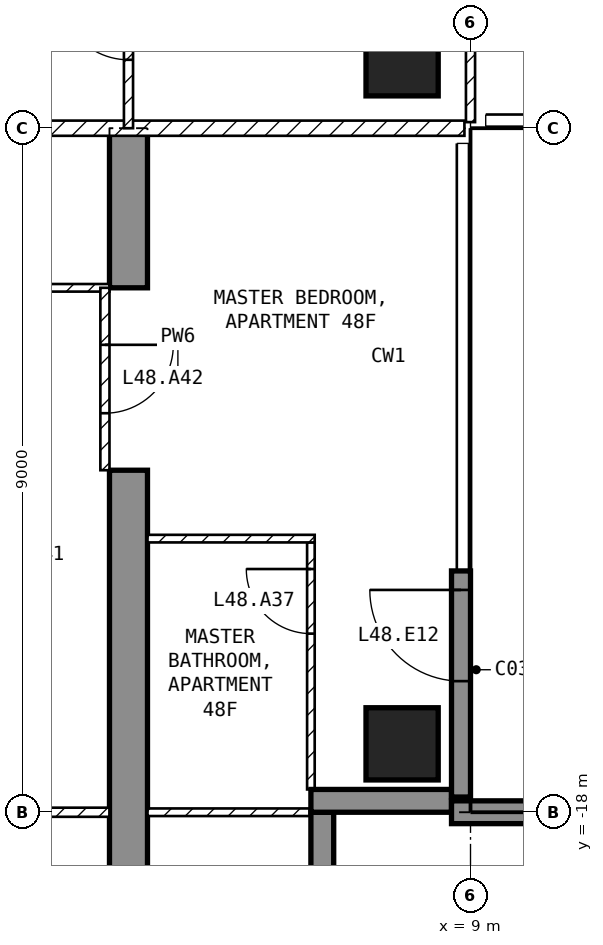
"""IFC4 building model, lengths in metres.
Left out: names, types, materials, properties, quantities, classifications, styles, units other than length and angle.
Written with IfcOpenShell. Run it as: python <this file> out.ifc"""

import sys

from ifc_helpers import new_model, si_unit, direction, frame, frame_2d, origin, origin_2d, place, context, subcontext, project, spatial, polyline, rectangle, outline, extrude, element, fill, save


model = new_model("IFC4")
c1 = context("Model", 3, precision=1e-05, world=origin(), true_north=direction((0.0, 1.0)))
c2 = subcontext(c1, "Body", "Model", "MODEL_VIEW")
j1 = project(units=[si_unit("LENGTHUNIT", "METRE"), si_unit("PLANEANGLEUNIT", "RADIAN")], contexts=[c1])
p1 = place(None, origin())
s1 = spatial("IfcSite", under=j1, at=p1, CompositionType="ELEMENT")
p2 = place(p1, origin())
s2 = spatial("IfcBuilding", under=s1, at=p2, CompositionType="ELEMENT")
p3 = place(p2, frame((0.0, 0.0, 194.6)))
s3 = spatial("IfcBuildingStorey", under=s2, at=p3, CompositionType="ELEMENT", Elevation=194.6)
for number, where, z_axis, x_axis in (
    (1, (8.1, -17.1, -0.25), (0.0, 0.0, 1.0), (1.0, 0.0, 0.0)),
    (2, (8.1, -8.1, -0.25), (0.0, 0.0, 1.0), (1.0, 0.0, 0.0)),
):
    element("IfcColumn", number, at=place(p3, frame(where, z_axis=z_axis, x_axis=x_axis)), inside=s3, PredefinedType="COLUMN", context=c2, shape_type="SweptSolid", body=[
        extrude(rectangle(XDim=0.95, YDim=0.95, at=origin_2d()), origin(), (0.0, 0.0, 1.0), 3.5),
    ])
p4 = place(p3, frame((4.25, -20.225, -0.25), z_axis=(1.0, 0.0, 0.0), x_axis=(0.0, 1.0, 0.0)))
e3 = element("IfcWall", 3, at=p4, inside=s3, PredefinedType="SHEAR", context=c2, shape_type="SweptSolid", body=[
    extrude(outline(polyline([(0.0, 0.0), (6.725, 0.0), (6.725, 2.65), (9.125, 2.65), (9.125, 0.0), (11.225, 0.0), (11.225, 3.5), (0.0, 3.5), (0.0, 0.0)])), origin(), (0.0, 0.0, 1.0), 0.5),
])
p5 = place(p3, frame((8.875, -17.8, 0.0), z_axis=(0.0, 0.0, 1.0), x_axis=(0.0, 1.0, 0.0)))
e4 = element("IfcWall", 4, at=p5, inside=s3, PredefinedType="SOLIDWALL", context=c2, shape_type="SweptSolid", body=[
    extrude(rectangle(XDim=2.975, YDim=0.25, at=frame_2d((1.488, 0.0))), origin(), (0.0, 0.0, 1.0), 3.25),
])
p6 = place(p5, frame((1.525, 0.0, 0.0)))
e5 = element("IfcOpeningElement", 5, at=p6, cuts=e4, PredefinedType="OPENING", context=c2, shape_type="SweptSolid", body=[
    extrude(rectangle(XDim=1.2, YDim=2.4, at=frame_2d((0.6, 1.2))), frame((0.0, 0.135, 0.0), z_axis=(0.0, -1.0, 0.0), x_axis=(1.0, 0.0, 0.0)), (0.0, 0.0, 1.0), 0.27),
])
p7 = place(p3, frame((7.05, -19.8, 0.0), z_axis=(0.0, 0.0, 1.0), x_axis=(0.0, 1.0, 0.0)))
e6 = element("IfcWall", 6, at=p7, inside=s3, PredefinedType="SOLIDWALL", context=c2, shape_type="SweptSolid", body=[
    extrude(rectangle(XDim=1.8, YDim=0.3, at=frame_2d((0.9, 0.0))), origin(), (0.0, 0.0, 1.0), 3.25),
])
p8 = place(p3, frame((6.9, -17.85, 0.0), z_axis=(0.0, 0.0, 1.0), x_axis=(1.0, 0.0, 0.0)))
e7 = element("IfcWall", 7, at=p8, inside=s3, PredefinedType="SOLIDWALL", context=c2, shape_type="SweptSolid", body=[
    extrude(rectangle(XDim=1.85, YDim=0.3, at=frame_2d((0.925, 0.0))), origin(), (0.0, 0.0, 1.0), 3.25),
])
p9 = place(p3, frame((8.75, -18.0, 0.0), z_axis=(0.0, 0.0, 1.0), x_axis=(1.0, 0.0, 0.0)))
e8 = element("IfcWall", 8, at=p9, inside=s3, PredefinedType="SOLIDWALL", context=c2, shape_type="SweptSolid", body=[
    extrude(rectangle(XDim=2.95, YDim=0.3, at=frame_2d((1.475, 0.0))), origin(), (0.0, 0.0, 1.0), 3.25),
])
p10 = place(p3, frame((8.92, -9.0, 0.0), z_axis=(0.0, 0.0, 1.0), x_axis=(-1.0, 0.0, 0.0)))
e9 = element("IfcWall", 9, at=p10, inside=s3, PredefinedType="PARTITIONING", context=c2, shape_type="SweptSolid", body=[
    extrude(rectangle(XDim=17.84, YDim=0.2, at=frame_2d((8.92, 0.0))), origin(), (0.0, 0.0, 1.0), 3.25),
])
p11 = place(p10, frame((8.42, 0.0, 0.0)))
e10 = element("IfcOpeningElement", 10, at=p11, cuts=e9, PredefinedType="OPENING", context=c2, shape_type="SweptSolid", body=[
    extrude(rectangle(XDim=1.0, YDim=2.1, at=frame_2d((0.5, 1.05))), frame((0.0, 0.11, 0.0), z_axis=(0.0, -1.0, 0.0), x_axis=(1.0, 0.0, 0.0)), (0.0, 0.0, 1.0), 0.22),
])
p12 = place(p3, frame((9.0, -8.92, 0.0), z_axis=(0.0, 0.0, 1.0), x_axis=(0.0, 1.0, 0.0)))
e11 = element("IfcWall", 11, at=p12, inside=s3, PredefinedType="PARTITIONING", context=c2, shape_type="SweptSolid", body=[
    extrude(rectangle(XDim=7.62, YDim=0.12, at=frame_2d((3.81, 0.0))), origin(), (0.0, 0.0, 1.0), 3.25),
])
p13 = place(p12, frame((2.62, 0.0, 0.0)))
e12 = element("IfcOpeningElement", 12, at=p13, cuts=e11, PredefinedType="OPENING", context=c2, shape_type="SweptSolid", body=[
    extrude(rectangle(XDim=0.9, YDim=2.1, at=frame_2d((0.45, 1.05))), frame((0.0, 0.07, 0.0), z_axis=(0.0, -1.0, 0.0), x_axis=(1.0, 0.0, 0.0)), (0.0, 0.0, 1.0), 0.14),
])
p14 = place(p3, frame((4.5, -9.0, 0.0), z_axis=(0.0, 0.0, 1.0), x_axis=(0.0, 1.0, 0.0)))
e13 = element("IfcWall", 13, at=p14, inside=s3, PredefinedType="PARTITIONING", context=c2, shape_type="SweptSolid", body=[
    extrude(rectangle(XDim=2.7, YDim=0.12, at=frame_2d((1.35, 0.0))), origin(), (0.0, 0.0, 1.0), 3.25),
])
p15 = place(p14, frame((0.9, 0.0, 0.0)))
e14 = element("IfcOpeningElement", 14, at=p15, cuts=e13, PredefinedType="OPENING", context=c2, shape_type="SweptSolid", body=[
    extrude(rectangle(XDim=0.9, YDim=2.1, at=frame_2d((0.45, 1.05))), frame((0.0, 0.07, 0.0), z_axis=(0.0, -1.0, 0.0), x_axis=(1.0, 0.0, 0.0)), (0.0, 0.0, 1.0), 0.14),
])
p16 = place(p3, frame((4.25, -11.1, 0.0), z_axis=(0.0, 0.0, 1.0), x_axis=(-1.0, 0.0, 0.0)))
e15 = element("IfcWall", 15, at=p16, inside=s3, PredefinedType="PARTITIONING", context=c2, shape_type="SweptSolid", body=[
    extrude(rectangle(XDim=2.15, YDim=0.1, at=frame_2d((1.075, 0.0))), origin(), (0.0, 0.0, 1.0), 3.25),
])
p17 = place(p3, frame((4.25, -18.0, 0.0), z_axis=(0.0, 0.0, 1.0), x_axis=(-1.0, 0.0, 0.0)))
e16 = element("IfcWall", 16, at=p17, inside=s3, PredefinedType="PARTITIONING", context=c2, shape_type="SweptSolid", body=[
    extrude(rectangle(XDim=8.5, YDim=0.12, at=frame_2d((4.25, 0.0))), origin(), (0.0, 0.0, 1.0), 3.25),
])
p18 = place(p17, frame((1.925, 0.0, 0.0)))
e17 = element("IfcOpeningElement", 17, at=p18, cuts=e16, PredefinedType="OPENING", context=c2, shape_type="SweptSolid", body=[
    extrude(rectangle(XDim=0.9, YDim=2.1, at=frame_2d((0.45, 1.05))), frame((0.0, 0.07, 0.0), z_axis=(0.0, -1.0, 0.0), x_axis=(1.0, 0.0, 0.0)), (0.0, 0.0, 1.0), 0.14),
])
p19 = place(p3, frame((6.9, -17.7, 0.0), z_axis=(0.0, 0.0, 1.0), x_axis=(0.0, 1.0, 0.0)))
e18 = element("IfcWall", 18, at=p19, inside=s3, PredefinedType="PARTITIONING", context=c2, shape_type="SweptSolid", body=[
    extrude(rectangle(XDim=3.25, YDim=0.1, at=frame_2d((1.625, 0.0))), origin(), (0.0, 0.0, 1.0), 3.25),
])
p20 = place(p19, frame((2.05, 0.0, 0.0)))
e19 = element("IfcOpeningElement", 19, at=p20, cuts=e18, PredefinedType="OPENING", context=c2, shape_type="SweptSolid", body=[
    extrude(rectangle(XDim=0.85, YDim=2.1, at=frame_2d((0.425, 1.05))), frame((0.0, 0.06, 0.0), z_axis=(0.0, -1.0, 0.0), x_axis=(1.0, 0.0, 0.0)), (0.0, 0.0, 1.0), 0.12),
])
p21 = place(p3, frame((6.95, -14.4, 0.0), z_axis=(0.0, 0.0, 1.0), x_axis=(-1.0, 0.0, 0.0)))
e20 = element("IfcWall", 20, at=p21, inside=s3, PredefinedType="PARTITIONING", context=c2, shape_type="SweptSolid", body=[
    extrude(rectangle(XDim=2.2, YDim=0.1, at=frame_2d((1.1, 0.0))), origin(), (0.0, 0.0, 1.0), 3.25),
])
p22 = place(p3, frame((7.12, -18.0, 0.0), z_axis=(0.0, 0.0, 1.0), x_axis=(-1.0, 0.0, 0.0)))
e21 = element("IfcWall", 21, at=p22, inside=s3, PredefinedType="PARTITIONING", context=c2, shape_type="SweptSolid", body=[
    extrude(rectangle(XDim=2.37, YDim=0.1, at=frame_2d((1.185, 0.0))), origin(), (0.0, 0.0, 1.0), 3.25),
])
p23 = place(p3, frame((4.19, -11.1, 0.0), z_axis=(0.0, 0.0, 1.0), x_axis=(0.0, -1.0, 0.0)))
e22 = element("IfcWall", 22, at=p23, inside=s3, PredefinedType="PARTITIONING", context=c2, shape_type="SweptSolid", body=[
    extrude(rectangle(XDim=2.4, YDim=0.12, at=frame_2d((1.2, 0.0))), origin(), (0.0, 0.0, 1.0), 2.4),
])
p24 = place(p23, frame((0.75, 0.0, 0.0)))
e23 = element("IfcOpeningElement", 23, at=p24, cuts=e22, PredefinedType="OPENING", context=c2, shape_type="SweptSolid", body=[
    extrude(rectangle(XDim=0.9, YDim=2.1, at=frame_2d((0.45, 1.05))), frame((0.0, 0.07, 0.0), z_axis=(0.0, -1.0, 0.0), x_axis=(1.0, 0.0, 0.0)), (0.0, 0.0, 1.0), 0.14),
])
p25 = place(p6, origin())
e24 = element("IfcDoor", 24, at=p25, inside=s3, OperationType="SINGLE_SWING_RIGHT", PredefinedType="DOOR", context=c2, shape_type="SweptSolid", body=[
    extrude(rectangle(XDim=1.2, YDim=2.4, at=frame_2d((0.6, 1.2))), frame((0.0, 0.025, 0.0), z_axis=(0.0, -1.0, 0.0), x_axis=(1.0, 0.0, 0.0)), (0.0, 0.0, 1.0), 0.05),
])
fill(e5, e24)
p26 = place(p15, origin())
e25 = element("IfcDoor", 25, at=p26, inside=s3, OperationType="SINGLE_SWING_RIGHT", PredefinedType="DOOR", context=c2, shape_type="SweptSolid", body=[
    extrude(rectangle(XDim=0.9, YDim=2.1, at=frame_2d((0.45, 1.05))), frame((0.0, 0.025, 0.0), z_axis=(0.0, -1.0, 0.0), x_axis=(1.0, 0.0, 0.0)), (0.0, 0.0, 1.0), 0.05),
])
fill(e14, e25)
p27 = place(p20, origin())
e26 = element("IfcDoor", 26, at=p27, inside=s3, OperationType="SINGLE_SWING_RIGHT", PredefinedType="DOOR", context=c2, shape_type="SweptSolid", body=[
    extrude(rectangle(XDim=0.85, YDim=2.1, at=frame_2d((0.425, 1.05))), frame((0.0, 0.025, 0.0), z_axis=(0.0, -1.0, 0.0), x_axis=(1.0, 0.0, 0.0)), (0.0, 0.0, 1.0), 0.05),
])
fill(e19, e26)
p28 = place(p24, origin())
e27 = element("IfcDoor", 27, at=p28, inside=s3, OperationType="SINGLE_SWING_LEFT", PredefinedType="DOOR", context=c2, shape_type="SweptSolid", body=[
    extrude(rectangle(XDim=0.9, YDim=2.1, at=frame_2d((0.45, 1.05))), frame((0.0, 0.025, 0.0), z_axis=(0.0, -1.0, 0.0), x_axis=(1.0, 0.0, 0.0)), (0.0, 0.0, 1.0), 0.05),
])
fill(e23, e27)
save(model, sys.argv[1])
